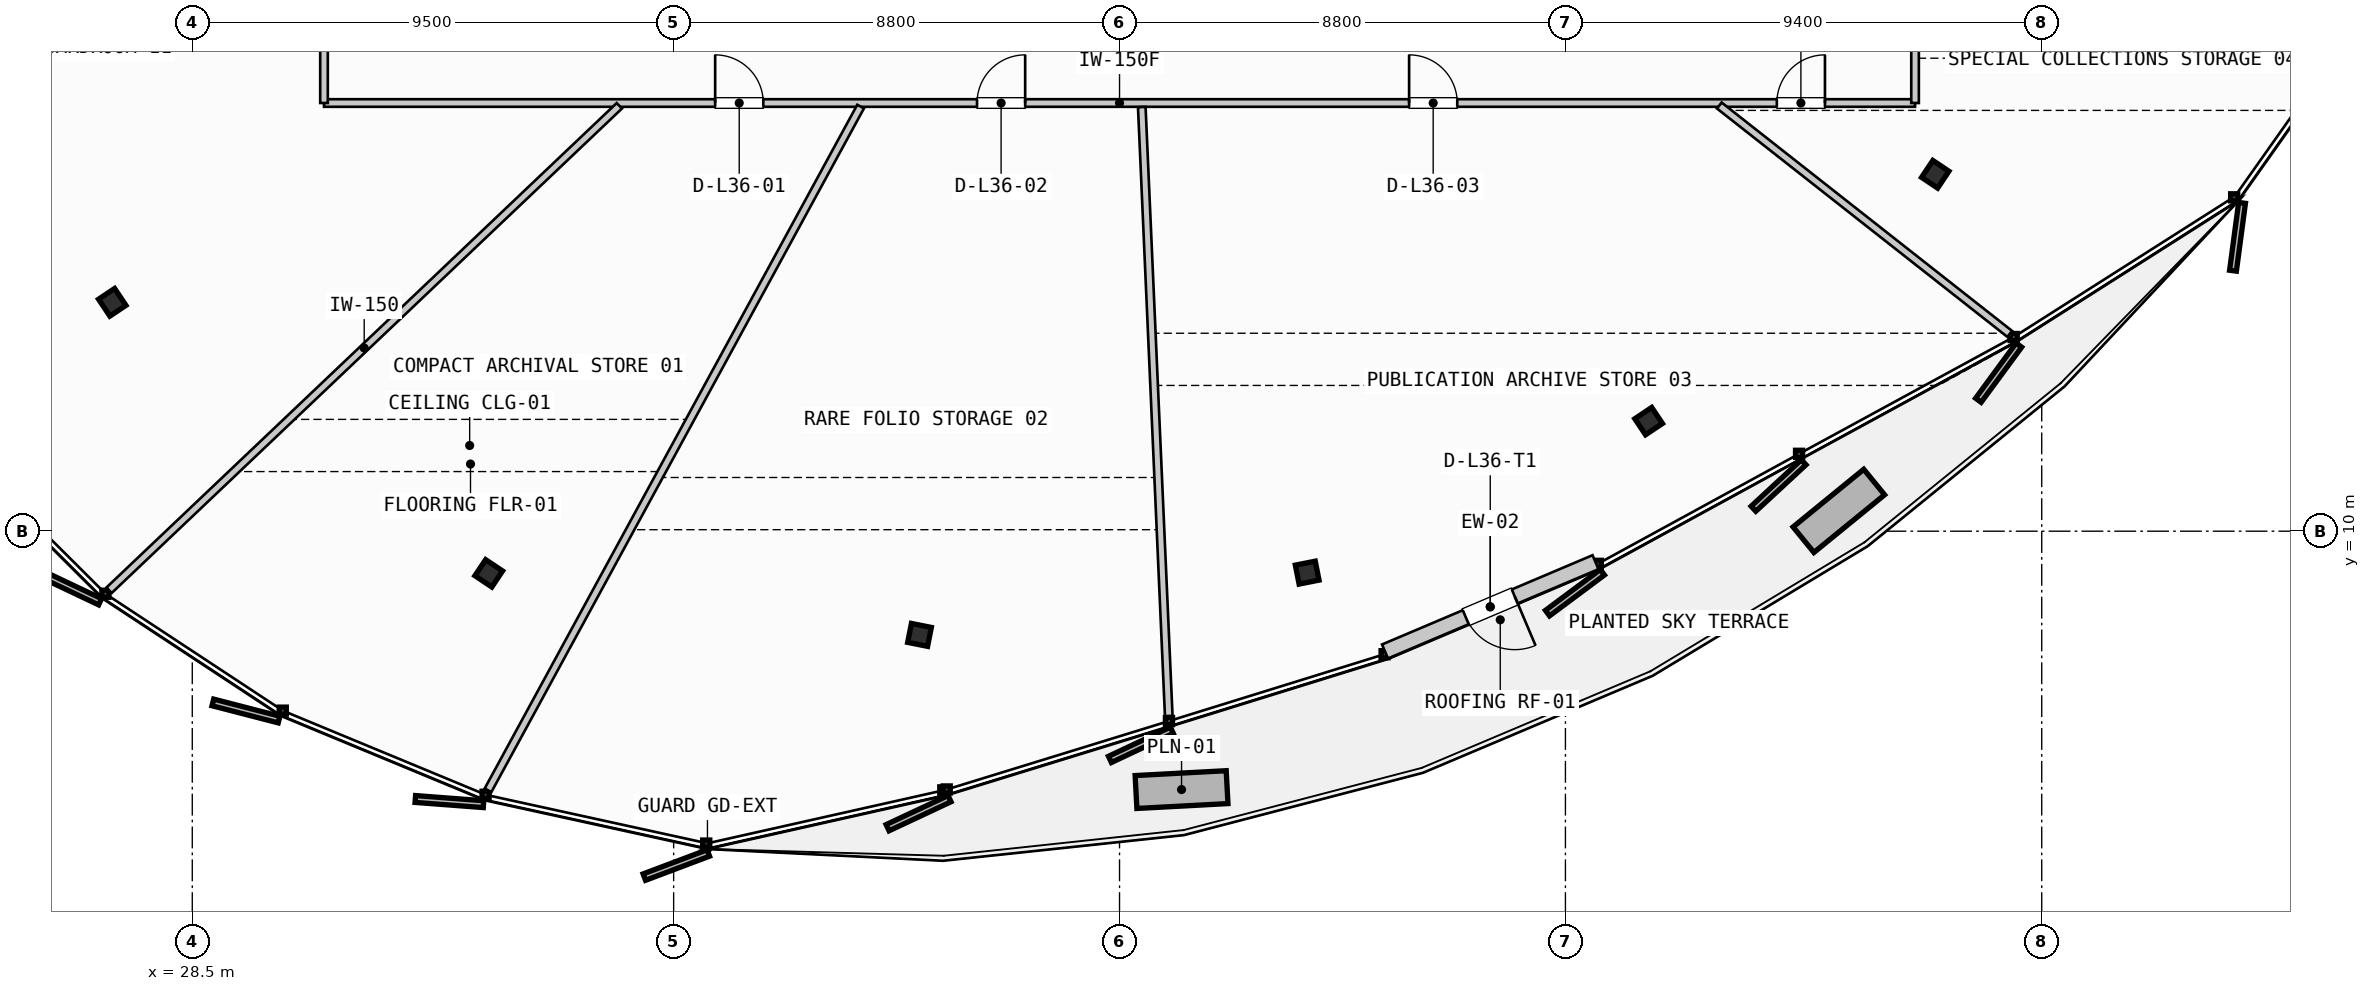
"""IFC4 building model, lengths in metres.
Left out: names, types, materials, properties, quantities, classifications, styles, units other than length and angle.
Written with IfcOpenShell. Run it as: python <this file> out.ifc"""

import sys

from ifc_helpers import new_model, si_unit, direction, frame, frame_2d, origin, origin_2d, place, context, subcontext, project, spatial, rectangle, i_section, extrude, source, transform, mapped, element, fill, save


model = new_model("IFC4")
c1 = context("Model", 3, precision=1e-05, world=origin(), true_north=direction((0.0, 1.0)))
c2 = subcontext(c1, "Body", "Model", "MODEL_VIEW")
j1 = project(units=[si_unit("LENGTHUNIT", "METRE"), si_unit("PLANEANGLEUNIT", "RADIAN")], contexts=[c1])
p1 = place(None, origin())
s1 = spatial("IfcSite", under=j1, at=p1, CompositionType="ELEMENT")
p2 = place(p1, origin())
s2 = spatial("IfcBuilding", under=s1, at=p2, CompositionType="ELEMENT")
p3 = place(p2, frame((0.0, 0.0, 143.0)))
s3 = spatial("IfcBuildingStorey", under=s2, at=p3, CompositionType="ELEMENT", Elevation=143.0)
m1 = source(origin(), c2, "Body", "SweptSolid", [
    extrude(i_section(OverallWidth=0.401, OverallDepth=0.381, WebThickness=0.032, FlangeThickness=0.051, FilletRadius=0.015, at=origin_2d()), origin(), (0.0, 0.0, 1.0), 3.3),
])
for number, where, z_axis, x_axis in (
    (1, (26.921, 14.517, 0.0), (0.0, 0.0, 1.0), (-0.831, -0.556, 0.0)),
    (2, (34.351, 9.168, 0.0), (0.0, 0.0, 1.0), (-0.556, -0.831, 0.0)),
    (3, (42.852, 7.954, 0.0), (0.0, 0.0, 1.0), (-0.195, -0.981, 0.0)),
    (4, (50.503, 9.182, 0.0), (0.0, 0.0, 1.0), (0.195, -0.981, 0.0)),
    (5, (57.242, 12.172, 0.0), (0.0, 0.0, 1.0), (0.556, -0.831, 0.0)),
    (6, (62.899, 17.043, 0.0), (0.0, 0.0, 1.0), (0.831, -0.556, 0.0)),
):
    element("IfcColumn", number, at=place(p3, frame(where, z_axis=z_axis, x_axis=x_axis)), inside=s3, PredefinedType="COLUMN", context=c2, shape_type="MappedRepresentation", body=[
        mapped(m1, transform((0.0, 0.0, 0.0), scale=1.0)),
    ])
p4 = place(p3, frame((56.194, 9.388, 0.0), z_axis=(0.0, 0.0, 1.0), x_axis=(-0.920663095643, -0.390358123166, 0.0)))
e7 = element("IfcWall", 7, at=p4, inside=s3, PredefinedType="SOLIDWALL", context=c2, shape_type="SweptSolid", body=[
    extrude(rectangle(XDim=4.513, YDim=0.3, at=frame_2d((2.257, 0.0))), origin(), (0.0, 0.0, 1.0), 2.725),
])
p5 = place(p4, frame((1.731, 0.0, 0.0)))
e8 = element("IfcOpeningElement", 8, at=p5, cuts=e7, PredefinedType="OPENING", context=c2, shape_type="SweptSolid", body=[
    extrude(rectangle(XDim=1.05, YDim=2.2, at=frame_2d((0.525, 1.1))), frame((0.0, 0.16, 0.0), z_axis=(0.0, -1.0, 0.0), x_axis=(1.0, 0.0, 0.0)), (0.0, 0.0, 1.0), 0.32),
])
p6 = place(p3, frame((31.1, 18.45, 0.0), z_axis=(0.0, 0.0, 1.0), x_axis=(1.0, 0.0, 0.0)))
e9 = element("IfcWall", 9, at=p6, inside=s3, PredefinedType="PARTITIONING", context=c2, shape_type="SweptSolid", body=[
    extrude(rectangle(XDim=31.4, YDim=0.15, at=frame_2d((15.7, 0.0))), origin(), (0.0, 0.0, 1.0), 2.305),
])
p7 = place(p6, frame((7.719, 0.0, 0.0)))
e10 = element("IfcOpeningElement", 10, at=p7, cuts=e9, PredefinedType="OPENING", context=c2, shape_type="SweptSolid", body=[
    extrude(rectangle(XDim=0.95, YDim=2.15, at=frame_2d((0.475, 1.075))), frame((0.0, 0.085, 0.0), z_axis=(0.0, -1.0, 0.0), x_axis=(1.0, 0.0, 0.0)), (0.0, 0.0, 1.0), 0.17),
])
p8 = place(p6, frame((12.888, 0.0, 0.0)))
e11 = element("IfcOpeningElement", 11, at=p8, cuts=e9, PredefinedType="OPENING", context=c2, shape_type="SweptSolid", body=[
    extrude(rectangle(XDim=0.95, YDim=2.15, at=frame_2d((0.475, 1.075))), frame((0.0, 0.085, 0.0), z_axis=(0.0, -1.0, 0.0), x_axis=(1.0, 0.0, 0.0)), (0.0, 0.0, 1.0), 0.17),
])
p9 = place(p6, frame((21.415, 0.0, 0.0)))
e12 = element("IfcOpeningElement", 12, at=p9, cuts=e9, PredefinedType="OPENING", context=c2, shape_type="SweptSolid", body=[
    extrude(rectangle(XDim=0.95, YDim=2.15, at=frame_2d((0.475, 1.075))), frame((0.0, 0.085, 0.0), z_axis=(0.0, -1.0, 0.0), x_axis=(1.0, 0.0, 0.0)), (0.0, 0.0, 1.0), 0.17),
])
p10 = place(p6, frame((28.672, 0.0, 0.0)))
e13 = element("IfcOpeningElement", 13, at=p10, cuts=e9, PredefinedType="OPENING", context=c2, shape_type="SweptSolid", body=[
    extrude(rectangle(XDim=0.95, YDim=2.15, at=frame_2d((0.475, 1.075))), frame((0.0, 0.085, 0.0), z_axis=(0.0, -1.0, 0.0), x_axis=(1.0, 0.0, 0.0)), (0.0, 0.0, 1.0), 0.17),
])
for number, where, z_axis, x_axis in (
    (14, (62.5, 18.45, 0.0), (0.0, 0.0, 1.0), (0.0, 1.0, 0.0)),
    (15, (31.1, 20.15, 0.0), (0.0, 0.0, 1.0), (0.0, -1.0, 0.0)),
):
    element("IfcWall", number, at=place(p3, frame(where, z_axis=z_axis, x_axis=x_axis)), inside=s3, PredefinedType="PARTITIONING", context=c2, shape_type="SweptSolid", body=[
        extrude(rectangle(XDim=1.7, YDim=0.15, at=frame_2d((0.85, 0.0))), origin(), (0.0, 0.0, 1.0), 2.305),
    ])
p11 = place(p3, frame((36.928, 18.395, 0.0), z_axis=(0.0, 0.0, 1.0), x_axis=(-0.7252158145, -0.688521620865, 0.0)))
e16 = element("IfcWall", 16, at=p11, inside=s3, PredefinedType="PARTITIONING", context=c2, shape_type="SweptSolid", body=[
    extrude(rectangle(XDim=13.885, YDim=0.15, at=frame_2d((6.943, 0.0))), origin(), (0.0, 0.0, 1.0), 2.305),
])
p12 = place(p3, frame((41.69, 18.38, 0.0), z_axis=(0.0, 0.0, 1.0), x_axis=(-0.478524839703, -0.878074016121, 0.0)))
e17 = element("IfcWall", 17, at=p12, inside=s3, PredefinedType="PARTITIONING", context=c2, shape_type="SweptSolid", body=[
    extrude(rectangle(XDim=15.367, YDim=0.15, at=frame_2d((7.684, 0.0))), origin(), (0.0, 0.0, 1.0), 2.305),
])
p13 = place(p3, frame((47.239, 18.37, 0.0), z_axis=(0.0, 0.0, 1.0), x_axis=(0.044266919643, -0.999019739457, 0.0)))
e18 = element("IfcWall", 18, at=p13, inside=s3, PredefinedType="PARTITIONING", context=c2, shape_type="SweptSolid", body=[
    extrude(rectangle(XDim=12.029, YDim=0.15, at=frame_2d((6.014, 0.0))), origin(), (0.0, 0.0, 1.0), 2.305),
])
p14 = place(p3, frame((58.637, 18.401, 0.0), z_axis=(0.0, 0.0, 1.0), x_axis=(0.786094042095, -0.618106913877, 0.0)))
e19 = element("IfcWall", 19, at=p14, inside=s3, PredefinedType="PARTITIONING", context=c2, shape_type="SweptSolid", body=[
    extrude(rectangle(XDim=7.291, YDim=0.15, at=frame_2d((3.646, 0.0))), origin(), (0.0, 0.0, 1.0), 2.305),
])
m2 = source(origin(), c2, "Body", "SweptSolid", [
    extrude(rectangle(XDim=1.05, YDim=2.2, at=frame_2d((0.525, 1.1))), frame((0.0, 0.025, 0.0), z_axis=(0.0, -1.0, 0.0), x_axis=(1.0, 0.0, 0.0)), (0.0, 0.0, 1.0), 0.05),
])
p15 = place(p5, origin())
e20 = element("IfcDoor", 20, at=p15, inside=s3, OperationType="SINGLE_SWING_LEFT", PredefinedType="DOOR", context=c2, shape_type="MappedRepresentation", body=[
    mapped(m2, transform((0.0, 0.0, 0.0), scale=1.0)),
])
fill(e8, e20)
m3 = source(origin(), c2, "Body", "SweptSolid", [
    extrude(rectangle(XDim=0.95, YDim=2.15, at=frame_2d((0.475, 1.075))), frame((0.0, 0.025, 0.0), z_axis=(0.0, -1.0, 0.0), x_axis=(1.0, 0.0, 0.0)), (0.0, 0.0, 1.0), 0.05),
])
p16 = place(p7, origin())
e21 = element("IfcDoor", 21, at=p16, inside=s3, OperationType="SINGLE_SWING_LEFT", PredefinedType="DOOR", context=c2, shape_type="MappedRepresentation", body=[
    mapped(m3, transform((0.0, 0.0, 0.0), scale=1.0)),
])
fill(e10, e21)
p17 = place(p8, origin())
e22 = element("IfcDoor", 22, at=p17, inside=s3, OperationType="SINGLE_SWING_RIGHT", PredefinedType="DOOR", context=c2, shape_type="MappedRepresentation", body=[
    mapped(m3, transform((0.0, 0.0, 0.0), scale=1.0)),
])
fill(e11, e22)
p18 = place(p9, origin())
e23 = element("IfcDoor", 23, at=p18, inside=s3, OperationType="SINGLE_SWING_LEFT", PredefinedType="DOOR", context=c2, shape_type="MappedRepresentation", body=[
    mapped(m3, transform((0.0, 0.0, 0.0), scale=1.0)),
])
fill(e12, e23)
p19 = place(p10, origin())
e24 = element("IfcDoor", 24, at=p19, inside=s3, OperationType="SINGLE_SWING_RIGHT", PredefinedType="DOOR", context=c2, shape_type="MappedRepresentation", body=[
    mapped(m3, transform((0.0, 0.0, 0.0), scale=1.0)),
])
fill(e13, e24)
save(model, sys.argv[1])
